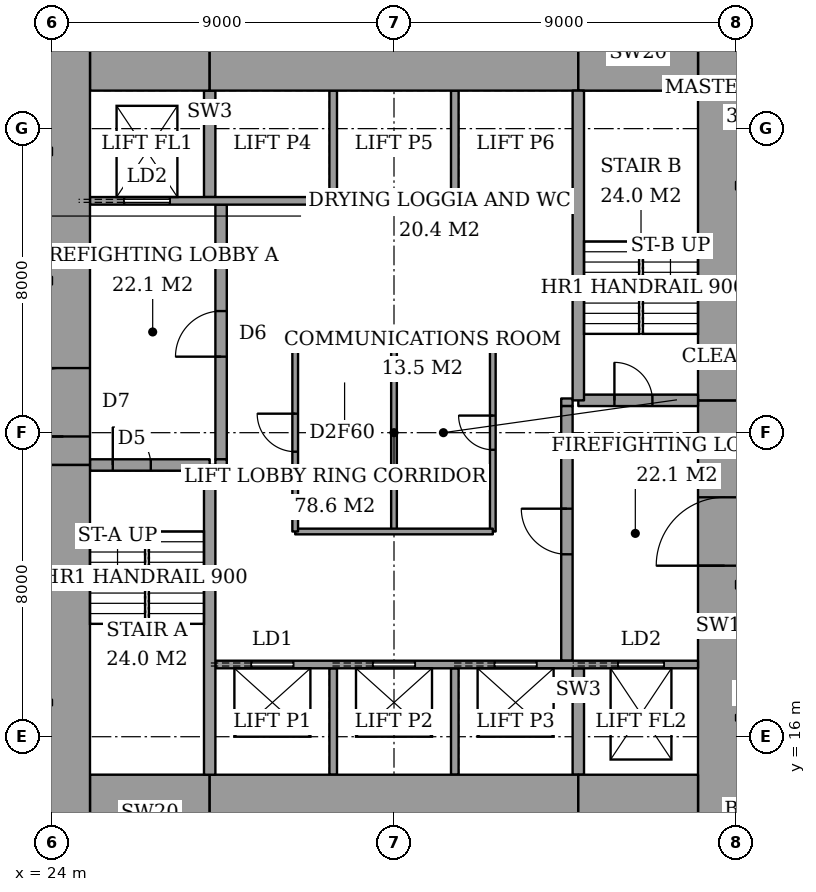
"""IFC4 building model, lengths in metres.
Left out: names, types, materials, properties, quantities, classifications, styles, units other than length and angle.
Written with IfcOpenShell. Run it as: python <this file> out.ifc"""

import sys

from ifc_helpers import new_model, si_unit, direction, frame, frame_2d, origin, place, context, subcontext, project, spatial, rectangle, extrude, element, fill, save


model = new_model("IFC4")
c1 = context("Model", 3, precision=1e-05, world=origin(), true_north=direction((0.0, 1.0)))
c2 = subcontext(c1, "Body", "Model", "MODEL_VIEW")
j1 = project(units=[si_unit("LENGTHUNIT", "METRE"), si_unit("PLANEANGLEUNIT", "RADIAN")], contexts=[c1])
p1 = place(None, origin())
s1 = spatial("IfcSite", under=j1, at=p1, CompositionType="ELEMENT")
p2 = place(p1, origin())
s2 = spatial("IfcBuilding", under=s1, at=p2, CompositionType="ELEMENT")
p3 = place(p2, frame((0.0, 0.0, 65.6)))
s3 = spatial("IfcBuildingStorey", under=s2, at=p3, CompositionType="ELEMENT", Elevation=65.6)
p4 = place(p3, frame((25.0, 14.0, 0.0), z_axis=(0.0, 0.0, 1.0), x_axis=(1.0, 0.0, 0.0)))
e1 = element("IfcWall", 1, at=p4, inside=s3, PredefinedType="SHEAR", context=c2, shape_type="SweptSolid", body=[
    extrude(rectangle(XDim=3.15, YDim=2.0, at=frame_2d((1.575, 0.0))), origin(), (0.0, 0.0, 1.0), 3.6),
])
p5 = place(p3, frame((28.15, 14.0, 0.0), z_axis=(0.0, 0.0, 1.0), x_axis=(1.0, 0.0, 0.0)))
e2 = element("IfcWall", 2, at=p5, inside=s3, PredefinedType="SHEAR", context=c2, shape_type="SweptSolid", body=[
    extrude(rectangle(XDim=9.7, YDim=2.0, at=frame_2d((4.85, 0.0))), origin(), (0.0, 0.0, 1.0), 3.6),
])
for number, where, z_axis, x_axis in (
    (3, (37.85, 14.0, 0.0), (0.0, 0.0, 1.0), (1.0, 0.0, 0.0)),
    (4, (25.0, 34.0, 0.0), (0.0, 0.0, 1.0), (1.0, 0.0, 0.0)),
):
    element("IfcWall", number, at=place(p3, frame(where, z_axis=z_axis, x_axis=x_axis)), inside=s3, PredefinedType="SHEAR", context=c2, shape_type="SweptSolid", body=[
        extrude(rectangle(XDim=3.15, YDim=2.0, at=frame_2d((1.575, 0.0))), origin(), (0.0, 0.0, 1.0), 3.6),
    ])
p6 = place(p3, frame((28.15, 34.0, 0.0), z_axis=(0.0, 0.0, 1.0), x_axis=(1.0, 0.0, 0.0)))
e5 = element("IfcWall", 5, at=p6, inside=s3, PredefinedType="SHEAR", context=c2, shape_type="SweptSolid", body=[
    extrude(rectangle(XDim=9.7, YDim=2.0, at=frame_2d((4.85, 0.0))), origin(), (0.0, 0.0, 1.0), 3.6),
])
p7 = place(p3, frame((37.85, 34.0, 0.0), z_axis=(0.0, 0.0, 1.0), x_axis=(1.0, 0.0, 0.0)))
e6 = element("IfcWall", 6, at=p7, inside=s3, PredefinedType="SHEAR", context=c2, shape_type="SweptSolid", body=[
    extrude(rectangle(XDim=3.15, YDim=2.0, at=frame_2d((1.575, 0.0))), origin(), (0.0, 0.0, 1.0), 3.6),
])
p8 = place(p3, frame((24.3, 13.0, 0.0), z_axis=(0.0, 0.0, 1.0), x_axis=(0.0, 1.0, 0.0)))
e7 = element("IfcWall", 7, at=p8, inside=s3, PredefinedType="SHEAR", context=c2, shape_type="SweptSolid", body=[
    extrude(rectangle(XDim=10.15, YDim=1.4, at=frame_2d((5.075, 0.0))), origin(), (0.0, 0.0, 1.0), 3.6),
])
p9 = place(p3, frame((24.3, 23.15, 0.0), z_axis=(0.0, 0.0, 1.0), x_axis=(0.0, 1.0, 0.0)))
e8 = element("IfcWall", 8, at=p9, inside=s3, PredefinedType="SHEAR", context=c2, shape_type="SweptSolid", body=[
    extrude(rectangle(XDim=11.85, YDim=1.4, at=frame_2d((5.925, 0.0))), origin(), (0.0, 0.0, 1.0), 3.6),
])
p10 = place(p9, frame((0.75, 0.0, 0.0)))
e9 = element("IfcOpeningElement", 9, at=p10, cuts=e8, PredefinedType="OPENING", context=c2, shape_type="SweptSolid", body=[
    extrude(rectangle(XDim=1.8, YDim=2.4, at=frame_2d((0.9, 1.2))), frame((0.0, 0.71, 0.0), z_axis=(0.0, -1.0, 0.0), x_axis=(1.0, 0.0, 0.0)), (0.0, 0.0, 1.0), 1.42),
])
p11 = place(p3, frame((41.7, 13.0, 0.0), z_axis=(0.0, 0.0, 1.0), x_axis=(0.0, 1.0, 0.0)))
e10 = element("IfcWall", 10, at=p11, inside=s3, PredefinedType="SHEAR", context=c2, shape_type="SweptSolid", body=[
    extrude(rectangle(XDim=11.85, YDim=1.4, at=frame_2d((5.925, 0.0))), origin(), (0.0, 0.0, 1.0), 3.6),
])
p12 = place(p11, frame((7.5, 0.0, 0.0)))
e11 = element("IfcOpeningElement", 11, at=p12, cuts=e10, PredefinedType="OPENING", context=c2, shape_type="SweptSolid", body=[
    extrude(rectangle(XDim=1.8, YDim=2.4, at=frame_2d((0.9, 1.2))), frame((0.0, 0.71, 0.0), z_axis=(0.0, -1.0, 0.0), x_axis=(1.0, 0.0, 0.0)), (0.0, 0.0, 1.0), 1.42),
])
p13 = place(p3, frame((41.7, 24.85, 0.0), z_axis=(0.0, 0.0, 1.0), x_axis=(0.0, 1.0, 0.0)))
e12 = element("IfcWall", 12, at=p13, inside=s3, PredefinedType="SHEAR", context=c2, shape_type="SweptSolid", body=[
    extrude(rectangle(XDim=10.15, YDim=1.4, at=frame_2d((5.075, 0.0))), origin(), (0.0, 0.0, 1.0), 3.6),
])
p14 = place(p3, frame((28.15, 15.0, 0.0), z_axis=(0.0, 0.0, 1.0), x_axis=(0.0, 1.0, 0.0)))
e13 = element("IfcWall", 13, at=p14, inside=s3, PredefinedType="SHEAR", context=c2, shape_type="SweptSolid", body=[
    extrude(rectangle(XDim=8.15, YDim=0.3, at=frame_2d((4.075, 0.0))), origin(), (0.0, 0.0, 1.0), 3.6),
])
p15 = place(p3, frame((25.0, 23.15, 0.0), z_axis=(0.0, 0.0, 1.0), x_axis=(1.0, 0.0, 0.0)))
e14 = element("IfcWall", 14, at=p15, inside=s3, PredefinedType="SHEAR", context=c2, shape_type="SweptSolid", body=[
    extrude(rectangle(XDim=3.15, YDim=0.3, at=frame_2d((1.575, 0.0))), origin(), (0.0, 0.0, 1.0), 3.6),
])
p16 = place(p15, frame((0.6, 0.0, 0.0)))
e15 = element("IfcOpeningElement", 15, at=p16, cuts=e14, PredefinedType="OPENING", context=c2, shape_type="SweptSolid", body=[
    extrude(rectangle(XDim=1.0, YDim=2.1, at=frame_2d((0.5, 1.05))), frame((0.0, 0.16, 0.0), z_axis=(0.0, -1.0, 0.0), x_axis=(1.0, 0.0, 0.0)), (0.0, 0.0, 1.0), 0.32),
])
p17 = place(p3, frame((37.85, 24.85, 0.0), z_axis=(0.0, 0.0, 1.0), x_axis=(0.0, 1.0, 0.0)))
e16 = element("IfcWall", 16, at=p17, inside=s3, PredefinedType="SHEAR", context=c2, shape_type="SweptSolid", body=[
    extrude(rectangle(XDim=8.15, YDim=0.3, at=frame_2d((4.075, 0.0))), origin(), (0.0, 0.0, 1.0), 3.6),
])
p18 = place(p3, frame((37.85, 24.85, 0.0), z_axis=(0.0, 0.0, 1.0), x_axis=(1.0, 0.0, 0.0)))
e17 = element("IfcWall", 17, at=p18, inside=s3, PredefinedType="SHEAR", context=c2, shape_type="SweptSolid", body=[
    extrude(rectangle(XDim=3.15, YDim=0.3, at=frame_2d((1.575, 0.0))), origin(), (0.0, 0.0, 1.0), 3.6),
])
p19 = place(p18, frame((0.95, 0.0, 0.0)))
e18 = element("IfcOpeningElement", 18, at=p19, cuts=e17, PredefinedType="OPENING", context=c2, shape_type="SweptSolid", body=[
    extrude(rectangle(XDim=1.0, YDim=2.1, at=frame_2d((0.5, 1.05))), frame((0.0, 0.16, 0.0), z_axis=(0.0, -1.0, 0.0), x_axis=(1.0, 0.0, 0.0)), (0.0, 0.0, 1.0), 0.32),
])
p20 = place(p3, frame((28.45, 23.3, 0.0), z_axis=(0.0, 0.0, 1.0), x_axis=(0.0, 1.0, 0.0)))
e19 = element("IfcWall", 19, at=p20, inside=s3, PredefinedType="PARTITIONING", context=c2, shape_type="SweptSolid", body=[
    extrude(rectangle(XDim=6.7, YDim=0.3, at=frame_2d((3.35, 0.0))), origin(), (0.0, 0.0, 1.0), 3.6),
])
p21 = place(p20, frame((2.7, 0.0, 0.0)))
e20 = element("IfcOpeningElement", 20, at=p21, cuts=e19, PredefinedType="OPENING", context=c2, shape_type="SweptSolid", body=[
    extrude(rectangle(XDim=1.2, YDim=2.1, at=frame_2d((0.6, 1.05))), frame((0.0, 0.16, 0.0), z_axis=(0.0, -1.0, 0.0), x_axis=(1.0, 0.0, 0.0)), (0.0, 0.0, 1.0), 0.32),
])
p22 = place(p3, frame((37.55, 18.0, 0.0), z_axis=(0.0, 0.0, 1.0), x_axis=(0.0, 1.0, 0.0)))
e21 = element("IfcWall", 21, at=p22, inside=s3, PredefinedType="PARTITIONING", context=c2, shape_type="SweptSolid", body=[
    extrude(rectangle(XDim=6.7, YDim=0.3, at=frame_2d((3.35, 0.0))), origin(), (0.0, 0.0, 1.0), 3.6),
])
p23 = place(p22, frame((2.8, 0.0, 0.0)))
e22 = element("IfcOpeningElement", 22, at=p23, cuts=e21, PredefinedType="OPENING", context=c2, shape_type="SweptSolid", body=[
    extrude(rectangle(XDim=1.2, YDim=2.1, at=frame_2d((0.6, 1.05))), frame((0.0, 0.16, 0.0), z_axis=(0.0, -1.0, 0.0), x_axis=(1.0, 0.0, 0.0)), (0.0, 0.0, 1.0), 0.32),
])
p24 = place(p3, frame((28.3, 17.9, 0.0), z_axis=(0.0, 0.0, 1.0), x_axis=(1.0, 0.0, 0.0)))
e23 = element("IfcWall", 23, at=p24, inside=s3, PredefinedType="PARTITIONING", context=c2, shape_type="SweptSolid", body=[
    extrude(rectangle(XDim=12.7, YDim=0.2, at=frame_2d((6.35, 0.0))), origin(), (0.0, 0.0, 1.0), 3.6),
])
p25 = place(p24, frame((0.95, 0.0, 0.0)))
e24 = element("IfcOpeningElement", 24, at=p25, cuts=e23, PredefinedType="OPENING", context=c2, shape_type="SweptSolid", body=[
    extrude(rectangle(XDim=1.1, YDim=2.1, at=frame_2d((0.55, 1.05))), frame((0.0, 0.11, 0.0), z_axis=(0.0, -1.0, 0.0), x_axis=(1.0, 0.0, 0.0)), (0.0, 0.0, 1.0), 0.22),
])
p26 = place(p24, frame((4.15, 0.0, 0.0)))
e25 = element("IfcOpeningElement", 25, at=p26, cuts=e23, PredefinedType="OPENING", context=c2, shape_type="SweptSolid", body=[
    extrude(rectangle(XDim=1.1, YDim=2.1, at=frame_2d((0.55, 1.05))), frame((0.0, 0.11, 0.0), z_axis=(0.0, -1.0, 0.0), x_axis=(1.0, 0.0, 0.0)), (0.0, 0.0, 1.0), 0.22),
])
p27 = place(p24, frame((7.35, 0.0, 0.0)))
e26 = element("IfcOpeningElement", 26, at=p27, cuts=e23, PredefinedType="OPENING", context=c2, shape_type="SweptSolid", body=[
    extrude(rectangle(XDim=1.1, YDim=2.1, at=frame_2d((0.55, 1.05))), frame((0.0, 0.11, 0.0), z_axis=(0.0, -1.0, 0.0), x_axis=(1.0, 0.0, 0.0)), (0.0, 0.0, 1.0), 0.22),
])
p28 = place(p24, frame((10.6, 0.0, 0.0)))
e27 = element("IfcOpeningElement", 27, at=p28, cuts=e23, PredefinedType="OPENING", context=c2, shape_type="SweptSolid", body=[
    extrude(rectangle(XDim=1.2, YDim=2.1, at=frame_2d((0.6, 1.05))), frame((0.0, 0.11, 0.0), z_axis=(0.0, -1.0, 0.0), x_axis=(1.0, 0.0, 0.0)), (0.0, 0.0, 1.0), 0.22),
])
p29 = place(p3, frame((25.0, 30.1, 0.0), z_axis=(0.0, 0.0, 1.0), x_axis=(1.0, 0.0, 0.0)))
e28 = element("IfcWall", 28, at=p29, inside=s3, PredefinedType="PARTITIONING", context=c2, shape_type="SweptSolid", body=[
    extrude(rectangle(XDim=12.7, YDim=0.2, at=frame_2d((6.35, 0.0))), origin(), (0.0, 0.0, 1.0), 3.6),
])
p30 = place(p29, frame((0.9, 0.0, 0.0)))
e29 = element("IfcOpeningElement", 29, at=p30, cuts=e28, PredefinedType="OPENING", context=c2, shape_type="SweptSolid", body=[
    extrude(rectangle(XDim=1.2, YDim=2.1, at=frame_2d((0.6, 1.05))), frame((0.0, 0.11, 0.0), z_axis=(0.0, -1.0, 0.0), x_axis=(1.0, 0.0, 0.0)), (0.0, 0.0, 1.0), 0.22),
])
for number, where, z_axis, x_axis in (
    (30, (31.4, 15.0, 0.0), (0.0, 0.0, 1.0), (0.0, 1.0, 0.0)),
    (31, (34.6, 15.0, 0.0), (0.0, 0.0, 1.0), (0.0, 1.0, 0.0)),
):
    element("IfcWall", number, at=place(p3, frame(where, z_axis=z_axis, x_axis=x_axis)), inside=s3, PredefinedType="PARTITIONING", context=c2, shape_type="SweptSolid", body=[
        extrude(rectangle(XDim=2.8, YDim=0.2, at=frame_2d((1.4, 0.0))), origin(), (0.0, 0.0, 1.0), 3.6),
    ])
p31 = place(p3, frame((37.85, 15.0, 0.0), z_axis=(0.0, 0.0, 1.0), x_axis=(0.0, 1.0, 0.0)))
e32 = element("IfcWall", 32, at=p31, inside=s3, PredefinedType="SHEAR", context=c2, shape_type="SweptSolid", body=[
    extrude(rectangle(XDim=2.8, YDim=0.3, at=frame_2d((1.4, 0.0))), origin(), (0.0, 0.0, 1.0), 3.6),
])
for number, where, z_axis, x_axis in (
    (33, (31.4, 30.2, 0.0), (0.0, 0.0, 1.0), (0.0, 1.0, 0.0)),
    (34, (34.6, 30.2, 0.0), (0.0, 0.0, 1.0), (0.0, 1.0, 0.0)),
):
    element("IfcWall", number, at=place(p3, frame(where, z_axis=z_axis, x_axis=x_axis)), inside=s3, PredefinedType="PARTITIONING", context=c2, shape_type="SweptSolid", body=[
        extrude(rectangle(XDim=2.8, YDim=0.2, at=frame_2d((1.4, 0.0))), origin(), (0.0, 0.0, 1.0), 3.6),
    ])
p32 = place(p3, frame((28.15, 30.2, 0.0), z_axis=(0.0, 0.0, 1.0), x_axis=(0.0, 1.0, 0.0)))
e35 = element("IfcWall", 35, at=p32, inside=s3, PredefinedType="SHEAR", context=c2, shape_type="SweptSolid", body=[
    extrude(rectangle(XDim=2.8, YDim=0.3, at=frame_2d((1.4, 0.0))), origin(), (0.0, 0.0, 1.0), 3.6),
])
for number, where, z_axis, x_axis in (
    (36, (28.3, 23.2, 0.0), (0.0, 0.0, 1.0), (1.0, 0.0, 0.0)),
    (37, (37.4, 24.8, 0.0), (0.0, 0.0, 1.0), (1.0, 0.0, 0.0)),
):
    element("IfcWall", number, at=place(p3, frame(where, z_axis=z_axis, x_axis=x_axis)), inside=s3, PredefinedType="PARTITIONING", context=c2, shape_type="SweptSolid", body=[
        extrude(rectangle(XDim=0.3, YDim=0.2, at=frame_2d((0.15, 0.0))), origin(), (0.0, 0.0, 1.0), 3.6),
    ])
for number, where, z_axis, x_axis in (
    (38, (30.4, 21.4, 0.0), (0.0, 0.0, 1.0), (1.0, 0.0, 0.0)),
    (39, (30.4, 26.6, 0.0), (0.0, 0.0, 1.0), (1.0, 0.0, 0.0)),
):
    element("IfcWall", number, at=place(p3, frame(where, z_axis=z_axis, x_axis=x_axis)), inside=s3, PredefinedType="PARTITIONING", context=c2, shape_type="SweptSolid", body=[
        extrude(rectangle(XDim=5.2, YDim=0.15, at=frame_2d((2.6, 0.0))), origin(), (0.0, 0.0, 1.0), 3.35),
    ])
p33 = place(p3, frame((30.4, 21.4, 0.0), z_axis=(0.0, 0.0, 1.0), x_axis=(0.0, 1.0, 0.0)))
e40 = element("IfcWall", 40, at=p33, inside=s3, PredefinedType="PARTITIONING", context=c2, shape_type="SweptSolid", body=[
    extrude(rectangle(XDim=5.2, YDim=0.15, at=frame_2d((2.6, 0.0))), origin(), (0.0, 0.0, 1.0), 3.35),
])
p34 = place(p33, frame((2.1, 0.0, 0.0)))
e41 = element("IfcOpeningElement", 41, at=p34, cuts=e40, PredefinedType="OPENING", context=c2, shape_type="SweptSolid", body=[
    extrude(rectangle(XDim=1.0, YDim=2.1, at=frame_2d((0.5, 1.05))), frame((0.0, 0.085, 0.0), z_axis=(0.0, -1.0, 0.0), x_axis=(1.0, 0.0, 0.0)), (0.0, 0.0, 1.0), 0.17),
])
p35 = place(p3, frame((35.6, 21.4, 0.0), z_axis=(0.0, 0.0, 1.0), x_axis=(0.0, 1.0, 0.0)))
e42 = element("IfcWall", 42, at=p35, inside=s3, PredefinedType="PARTITIONING", context=c2, shape_type="SweptSolid", body=[
    extrude(rectangle(XDim=5.2, YDim=0.15, at=frame_2d((2.6, 0.0))), origin(), (0.0, 0.0, 1.0), 3.35),
])
p36 = place(p35, frame((2.15, 0.0, 0.0)))
e43 = element("IfcOpeningElement", 43, at=p36, cuts=e42, PredefinedType="OPENING", context=c2, shape_type="SweptSolid", body=[
    extrude(rectangle(XDim=0.9, YDim=2.1, at=frame_2d((0.45, 1.05))), frame((0.0, 0.085, 0.0), z_axis=(0.0, -1.0, 0.0), x_axis=(1.0, 0.0, 0.0)), (0.0, 0.0, 1.0), 0.17),
])
p37 = place(p3, frame((33.0, 21.4, 0.0), z_axis=(0.0, 0.0, 1.0), x_axis=(0.0, 1.0, 0.0)))
e44 = element("IfcWall", 44, at=p37, inside=s3, PredefinedType="PARTITIONING", context=c2, shape_type="SweptSolid", body=[
    extrude(rectangle(XDim=5.2, YDim=0.15, at=frame_2d((2.6, 0.0))), origin(), (0.0, 0.0, 1.0), 3.35),
])
p38 = place(p16, origin())
e45 = element("IfcDoor", 45, at=p38, inside=s3, OperationType="SINGLE_SWING_RIGHT", PredefinedType="DOOR", context=c2, shape_type="SweptSolid", body=[
    extrude(rectangle(XDim=1.0, YDim=2.1, at=frame_2d((0.5, 1.05))), frame((0.0, 0.025, 0.0), z_axis=(0.0, -1.0, 0.0), x_axis=(1.0, 0.0, 0.0)), (0.0, 0.0, 1.0), 0.05),
])
fill(e15, e45)
p39 = place(p19, origin())
e46 = element("IfcDoor", 46, at=p39, inside=s3, OperationType="SINGLE_SWING_RIGHT", PredefinedType="DOOR", context=c2, shape_type="SweptSolid", body=[
    extrude(rectangle(XDim=1.0, YDim=2.1, at=frame_2d((0.5, 1.05))), frame((0.0, 0.025, 0.0), z_axis=(0.0, -1.0, 0.0), x_axis=(1.0, 0.0, 0.0)), (0.0, 0.0, 1.0), 0.05),
])
fill(e18, e46)
p40 = place(p21, origin())
e47 = element("IfcDoor", 47, at=p40, inside=s3, OperationType="SINGLE_SWING_RIGHT", PredefinedType="DOOR", context=c2, shape_type="SweptSolid", body=[
    extrude(rectangle(XDim=1.2, YDim=2.1, at=frame_2d((0.6, 1.05))), frame((0.0, 0.025, 0.0), z_axis=(0.0, -1.0, 0.0), x_axis=(1.0, 0.0, 0.0)), (0.0, 0.0, 1.0), 0.05),
])
fill(e20, e47)
p41 = place(p23, origin())
e48 = element("IfcDoor", 48, at=p41, inside=s3, OperationType="SINGLE_SWING_LEFT", PredefinedType="DOOR", context=c2, shape_type="SweptSolid", body=[
    extrude(rectangle(XDim=1.2, YDim=2.1, at=frame_2d((0.6, 1.05))), frame((0.0, 0.025, 0.0), z_axis=(0.0, -1.0, 0.0), x_axis=(1.0, 0.0, 0.0)), (0.0, 0.0, 1.0), 0.05),
])
fill(e22, e48)
p42 = place(p10, origin())
e49 = element("IfcDoor", 49, at=p42, inside=s3, OperationType="DOUBLE_DOOR_DOUBLE_SWING", PredefinedType="DOOR", context=c2, shape_type="SweptSolid", body=[
    extrude(rectangle(XDim=1.8, YDim=2.4, at=frame_2d((0.9, 1.2))), frame((0.0, 0.025, 0.0), z_axis=(0.0, -1.0, 0.0), x_axis=(1.0, 0.0, 0.0)), (0.0, 0.0, 1.0), 0.05),
])
fill(e9, e49)
p43 = place(p12, origin())
e50 = element("IfcDoor", 50, at=p43, inside=s3, OperationType="DOUBLE_DOOR_DOUBLE_SWING", PredefinedType="DOOR", context=c2, shape_type="SweptSolid", body=[
    extrude(rectangle(XDim=1.8, YDim=2.4, at=frame_2d((0.9, 1.2))), frame((0.0, 0.025, 0.0), z_axis=(0.0, -1.0, 0.0), x_axis=(1.0, 0.0, 0.0)), (0.0, 0.0, 1.0), 0.05),
])
fill(e11, e50)
p44 = place(p34, origin())
e51 = element("IfcDoor", 51, at=p44, inside=s3, OperationType="SINGLE_SWING_LEFT", PredefinedType="DOOR", context=c2, shape_type="SweptSolid", body=[
    extrude(rectangle(XDim=1.0, YDim=2.1, at=frame_2d((0.5, 1.05))), frame((0.0, 0.025, 0.0), z_axis=(0.0, -1.0, 0.0), x_axis=(1.0, 0.0, 0.0)), (0.0, 0.0, 1.0), 0.05),
])
fill(e41, e51)
p45 = place(p36, origin())
e52 = element("IfcDoor", 52, at=p45, inside=s3, OperationType="SINGLE_SWING_LEFT", PredefinedType="DOOR", context=c2, shape_type="SweptSolid", body=[
    extrude(rectangle(XDim=0.9, YDim=2.1, at=frame_2d((0.45, 1.05))), frame((0.0, 0.025, 0.0), z_axis=(0.0, -1.0, 0.0), x_axis=(1.0, 0.0, 0.0)), (0.0, 0.0, 1.0), 0.05),
])
fill(e43, e52)
p46 = place(p25, origin())
e53 = element("IfcDoor", 53, at=p46, inside=s3, OperationType="SLIDING_TO_LEFT", PredefinedType="DOOR", context=c2, shape_type="SweptSolid", body=[
    extrude(rectangle(XDim=1.1, YDim=2.1, at=frame_2d((0.55, 1.05))), frame((0.0, 0.025, 0.0), z_axis=(0.0, -1.0, 0.0), x_axis=(1.0, 0.0, 0.0)), (0.0, 0.0, 1.0), 0.05),
])
fill(e24, e53)
p47 = place(p26, origin())
e54 = element("IfcDoor", 54, at=p47, inside=s3, OperationType="SLIDING_TO_LEFT", PredefinedType="DOOR", context=c2, shape_type="SweptSolid", body=[
    extrude(rectangle(XDim=1.1, YDim=2.1, at=frame_2d((0.55, 1.05))), frame((0.0, 0.025, 0.0), z_axis=(0.0, -1.0, 0.0), x_axis=(1.0, 0.0, 0.0)), (0.0, 0.0, 1.0), 0.05),
])
fill(e25, e54)
p48 = place(p27, origin())
e55 = element("IfcDoor", 55, at=p48, inside=s3, OperationType="SLIDING_TO_LEFT", PredefinedType="DOOR", context=c2, shape_type="SweptSolid", body=[
    extrude(rectangle(XDim=1.1, YDim=2.1, at=frame_2d((0.55, 1.05))), frame((0.0, 0.025, 0.0), z_axis=(0.0, -1.0, 0.0), x_axis=(1.0, 0.0, 0.0)), (0.0, 0.0, 1.0), 0.05),
])
fill(e26, e55)
p49 = place(p30, origin())
e56 = element("IfcDoor", 56, at=p49, inside=s3, OperationType="SLIDING_TO_LEFT", PredefinedType="DOOR", context=c2, shape_type="SweptSolid", body=[
    extrude(rectangle(XDim=1.2, YDim=2.1, at=frame_2d((0.6, 1.05))), frame((0.0, 0.025, 0.0), z_axis=(0.0, -1.0, 0.0), x_axis=(1.0, 0.0, 0.0)), (0.0, 0.0, 1.0), 0.05),
])
fill(e29, e56)
p50 = place(p28, origin())
e57 = element("IfcDoor", 57, at=p50, inside=s3, OperationType="SLIDING_TO_LEFT", PredefinedType="DOOR", context=c2, shape_type="SweptSolid", body=[
    extrude(rectangle(XDim=1.2, YDim=2.1, at=frame_2d((0.6, 1.05))), frame((0.0, 0.025, 0.0), z_axis=(0.0, -1.0, 0.0), x_axis=(1.0, 0.0, 0.0)), (0.0, 0.0, 1.0), 0.05),
])
fill(e27, e57)
save(model, sys.argv[1])
